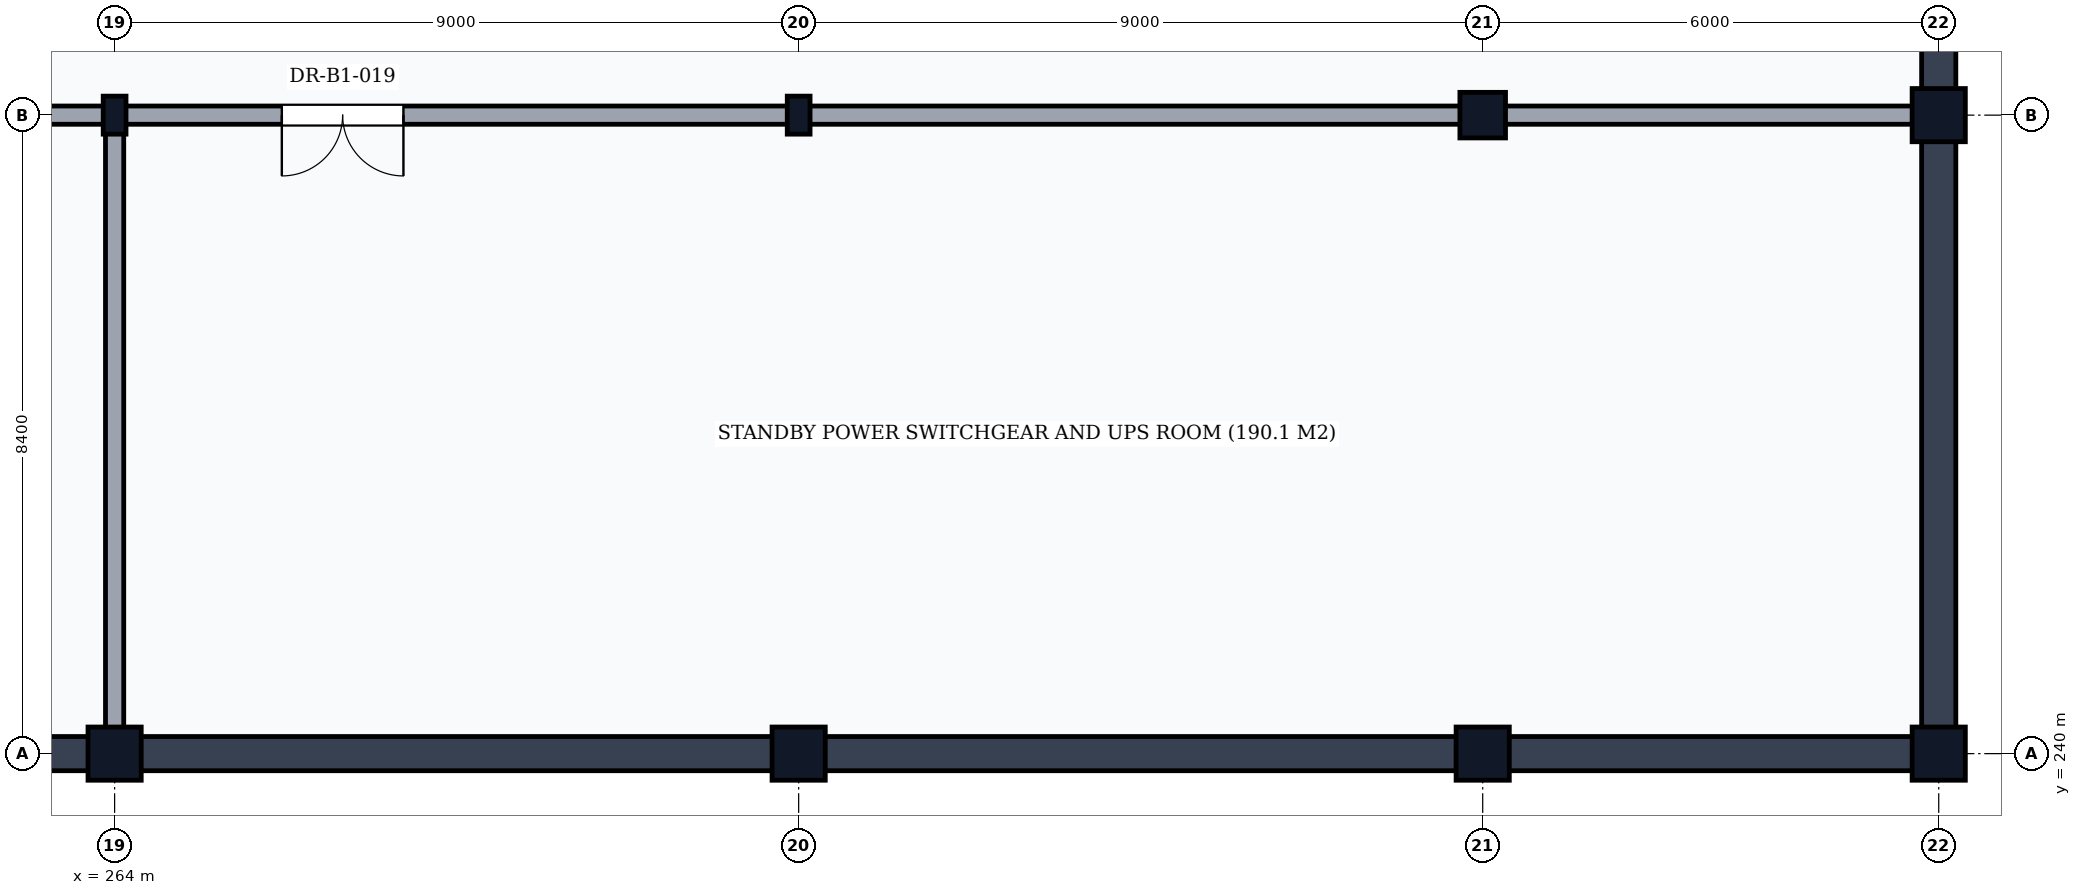
"""IFC4 building model, lengths in metres.
Left out: names, types, materials, properties, quantities, classifications, styles, units other than length and angle.
Written with IfcOpenShell. Run it as: python <this file> out.ifc"""

import sys

from ifc_helpers import new_model, si_unit, direction, frame, frame_2d, origin, origin_2d, place, context, subcontext, project, spatial, rectangle, i_section, extrude, element, fill, save


model = new_model("IFC4")
c1 = context("Model", 3, precision=1e-05, world=origin(), true_north=direction((0.0, 1.0)))
c2 = subcontext(c1, "Body", "Model", "MODEL_VIEW")
j1 = project(units=[si_unit("LENGTHUNIT", "METRE"), si_unit("PLANEANGLEUNIT", "RADIAN")], contexts=[c1])
p1 = place(None, origin())
s1 = spatial("IfcSite", under=j1, at=p1, CompositionType="ELEMENT")
p2 = place(p1, origin())
s2 = spatial("IfcBuilding", under=s1, at=p2, CompositionType="ELEMENT")
p3 = place(p2, frame((0.0, 0.0, -4.8)))
s3 = spatial("IfcBuildingStorey", under=s2, at=p3, CompositionType="ELEMENT", Elevation=-4.8)
p4 = place(p3, frame((264.0, 240.0, 0.0), z_axis=(0.0, 0.0, 1.0), x_axis=(1.0, 0.0, 0.0)))
e1 = element("IfcColumn", 1, at=p4, inside=s3, PredefinedType="COLUMN", context=c2, shape_type="SweptSolid", body=[
    extrude(rectangle(XDim=0.7, YDim=0.7, at=origin_2d()), origin(), (0.0, 0.0, 1.0), 4.8),
])
p5 = place(p3, frame((264.0, 248.4, 0.0), z_axis=(0.0, 0.0, 1.0), x_axis=(1.0, 0.0, 0.0)))
e2 = element("IfcColumn", 2, at=p5, inside=s3, PredefinedType="COLUMN", context=c2, shape_type="SweptSolid", body=[
    extrude(i_section(OverallWidth=0.3, OverallDepth=0.5, WebThickness=0.014, FlangeThickness=0.028, FilletRadius=0.027, at=origin_2d()), origin(), (0.0, 0.0, 1.0), 4.8),
])
p6 = place(p3, frame((273.0, 240.0, 0.0), z_axis=(0.0, 0.0, 1.0), x_axis=(1.0, 0.0, 0.0)))
e3 = element("IfcColumn", 3, at=p6, inside=s3, PredefinedType="COLUMN", context=c2, shape_type="SweptSolid", body=[
    extrude(rectangle(XDim=0.7, YDim=0.7, at=origin_2d()), origin(), (0.0, 0.0, 1.0), 4.8),
])
p7 = place(p3, frame((273.0, 248.4, 0.0), z_axis=(0.0, 0.0, 1.0), x_axis=(1.0, 0.0, 0.0)))
e4 = element("IfcColumn", 4, at=p7, inside=s3, PredefinedType="COLUMN", context=c2, shape_type="SweptSolid", body=[
    extrude(i_section(OverallWidth=0.3, OverallDepth=0.5, WebThickness=0.014, FlangeThickness=0.028, FilletRadius=0.027, at=origin_2d()), origin(), (0.0, 0.0, 1.0), 4.8),
])
p8 = place(p3, frame((282.0, 240.0, 0.0), z_axis=(0.0, 0.0, 1.0), x_axis=(1.0, 0.0, 0.0)))
e5 = element("IfcColumn", 5, at=p8, inside=s3, PredefinedType="COLUMN", context=c2, shape_type="SweptSolid", body=[
    extrude(rectangle(XDim=0.7, YDim=0.7, at=origin_2d()), origin(), (0.0, 0.0, 1.0), 4.8),
])
p9 = place(p3, frame((282.0, 248.4, 0.0), z_axis=(0.0, 0.0, 1.0), x_axis=(1.0, 0.0, 0.0)))
e6 = element("IfcColumn", 6, at=p9, inside=s3, PredefinedType="COLUMN", context=c2, shape_type="SweptSolid", body=[
    extrude(rectangle(XDim=0.6, YDim=0.6, at=origin_2d()), origin(), (0.0, 0.0, 1.0), 4.8),
])
for number, where, z_axis, x_axis in (
    (7, (288.0, 240.0, 0.0), (0.0, 0.0, 1.0), (1.0, 0.0, 0.0)),
    (8, (288.0, 248.4, 0.0), (0.0, 0.0, 1.0), (1.0, 0.0, 0.0)),
):
    element("IfcColumn", number, at=place(p3, frame(where, z_axis=z_axis, x_axis=x_axis)), inside=s3, PredefinedType="COLUMN", context=c2, shape_type="SweptSolid", body=[
        extrude(rectangle(XDim=0.7, YDim=0.7, at=origin_2d()), origin(), (0.0, 0.0, 1.0), 4.8),
    ])
for number, where, z_axis, x_axis in (
    (9, (255.0, 240.0, 0.0), (0.0, 0.0, 1.0), (1.0, 0.0, 0.0)),
    (10, (264.0, 240.0, 0.0), (0.0, 0.0, 1.0), (1.0, 0.0, 0.0)),
    (11, (273.0, 240.0, 0.0), (0.0, 0.0, 1.0), (1.0, 0.0, 0.0)),
):
    element("IfcWall", number, at=place(p3, frame(where, z_axis=z_axis, x_axis=x_axis)), inside=s3, PredefinedType="SHEAR", context=c2, shape_type="SweptSolid", body=[
        extrude(rectangle(XDim=9.0, YDim=0.45, at=frame_2d((4.5, 0.0))), origin(), (0.0, 0.0, 1.0), 4.51),
    ])
p10 = place(p3, frame((282.0, 240.0, 0.0), z_axis=(0.0, 0.0, 1.0), x_axis=(1.0, 0.0, 0.0)))
e12 = element("IfcWall", 12, at=p10, inside=s3, PredefinedType="SHEAR", context=c2, shape_type="SweptSolid", body=[
    extrude(rectangle(XDim=6.0, YDim=0.45, at=frame_2d((3.0, 0.0))), origin(), (0.0, 0.0, 1.0), 4.51),
])
p11 = place(p3, frame((288.0, 240.0, 0.0), z_axis=(0.0, 0.0, 1.0), x_axis=(0.0, 1.0, 0.0)))
e13 = element("IfcWall", 13, at=p11, inside=s3, PredefinedType="SHEAR", context=c2, shape_type="SweptSolid", body=[
    extrude(rectangle(XDim=8.4, YDim=0.45, at=frame_2d((4.2, 0.0))), origin(), (0.0, 0.0, 1.0), 4.51),
])
p12 = place(p3, frame((288.0, 248.4, 0.0), z_axis=(0.0, 0.0, 1.0), x_axis=(0.0, 1.0, 0.0)))
e14 = element("IfcWall", 14, at=p12, inside=s3, PredefinedType="SHEAR", context=c2, shape_type="SweptSolid", body=[
    extrude(rectangle(XDim=6.8, YDim=0.45, at=frame_2d((3.4, 0.0))), origin(), (0.0, 0.0, 1.0), 4.51),
])
p13 = place(p3, frame((255.0, 248.4, 0.0), z_axis=(0.0, 0.0, 1.0), x_axis=(1.0, 0.0, 0.0)))
e15 = element("IfcWall", 15, at=p13, inside=s3, PredefinedType="PARTITIONING", context=c2, shape_type="SweptSolid", body=[
    extrude(rectangle(XDim=33.0, YDim=0.24, at=frame_2d((16.5, 0.0))), origin(), (0.0, 0.0, 1.0), 3.808),
])
p14 = place(p13, frame((11.2, 0.0, 0.0)))
e16 = element("IfcOpeningElement", 16, at=p14, cuts=e15, PredefinedType="OPENING", context=c2, shape_type="SweptSolid", body=[
    extrude(rectangle(XDim=1.6, YDim=2.1, at=frame_2d((0.8, 1.05))), frame((0.0, 0.135, 0.0), z_axis=(0.0, -1.0, 0.0), x_axis=(1.0, 0.0, 0.0)), (0.0, 0.0, 1.0), 0.27),
])
p15 = place(p3, frame((264.0, 240.0, 0.0), z_axis=(0.0, 0.0, 1.0), x_axis=(0.0, 1.0, 0.0)))
e17 = element("IfcWall", 17, at=p15, inside=s3, PredefinedType="PARTITIONING", context=c2, shape_type="SweptSolid", body=[
    extrude(rectangle(XDim=8.4, YDim=0.24, at=frame_2d((4.2, 0.0))), origin(), (0.0, 0.0, 1.0), 3.858),
])
p16 = place(p14, frame((1.6, 0.0, 0.0), z_axis=(0.0, 0.0, 1.0), x_axis=(-1.0, 0.0, 0.0)))
e18 = element("IfcDoor", 18, at=p16, inside=s3, OperationType="DOUBLE_DOOR_SINGLE_SWING", PredefinedType="DOOR", context=c2, shape_type="SweptSolid", body=[
    extrude(rectangle(XDim=1.6, YDim=2.1, at=frame_2d((0.8, 1.05))), frame((0.0, 0.025, 0.0), z_axis=(0.0, -1.0, 0.0), x_axis=(1.0, 0.0, 0.0)), (0.0, 0.0, 1.0), 0.05),
])
fill(e16, e18)
save(model, sys.argv[1])
